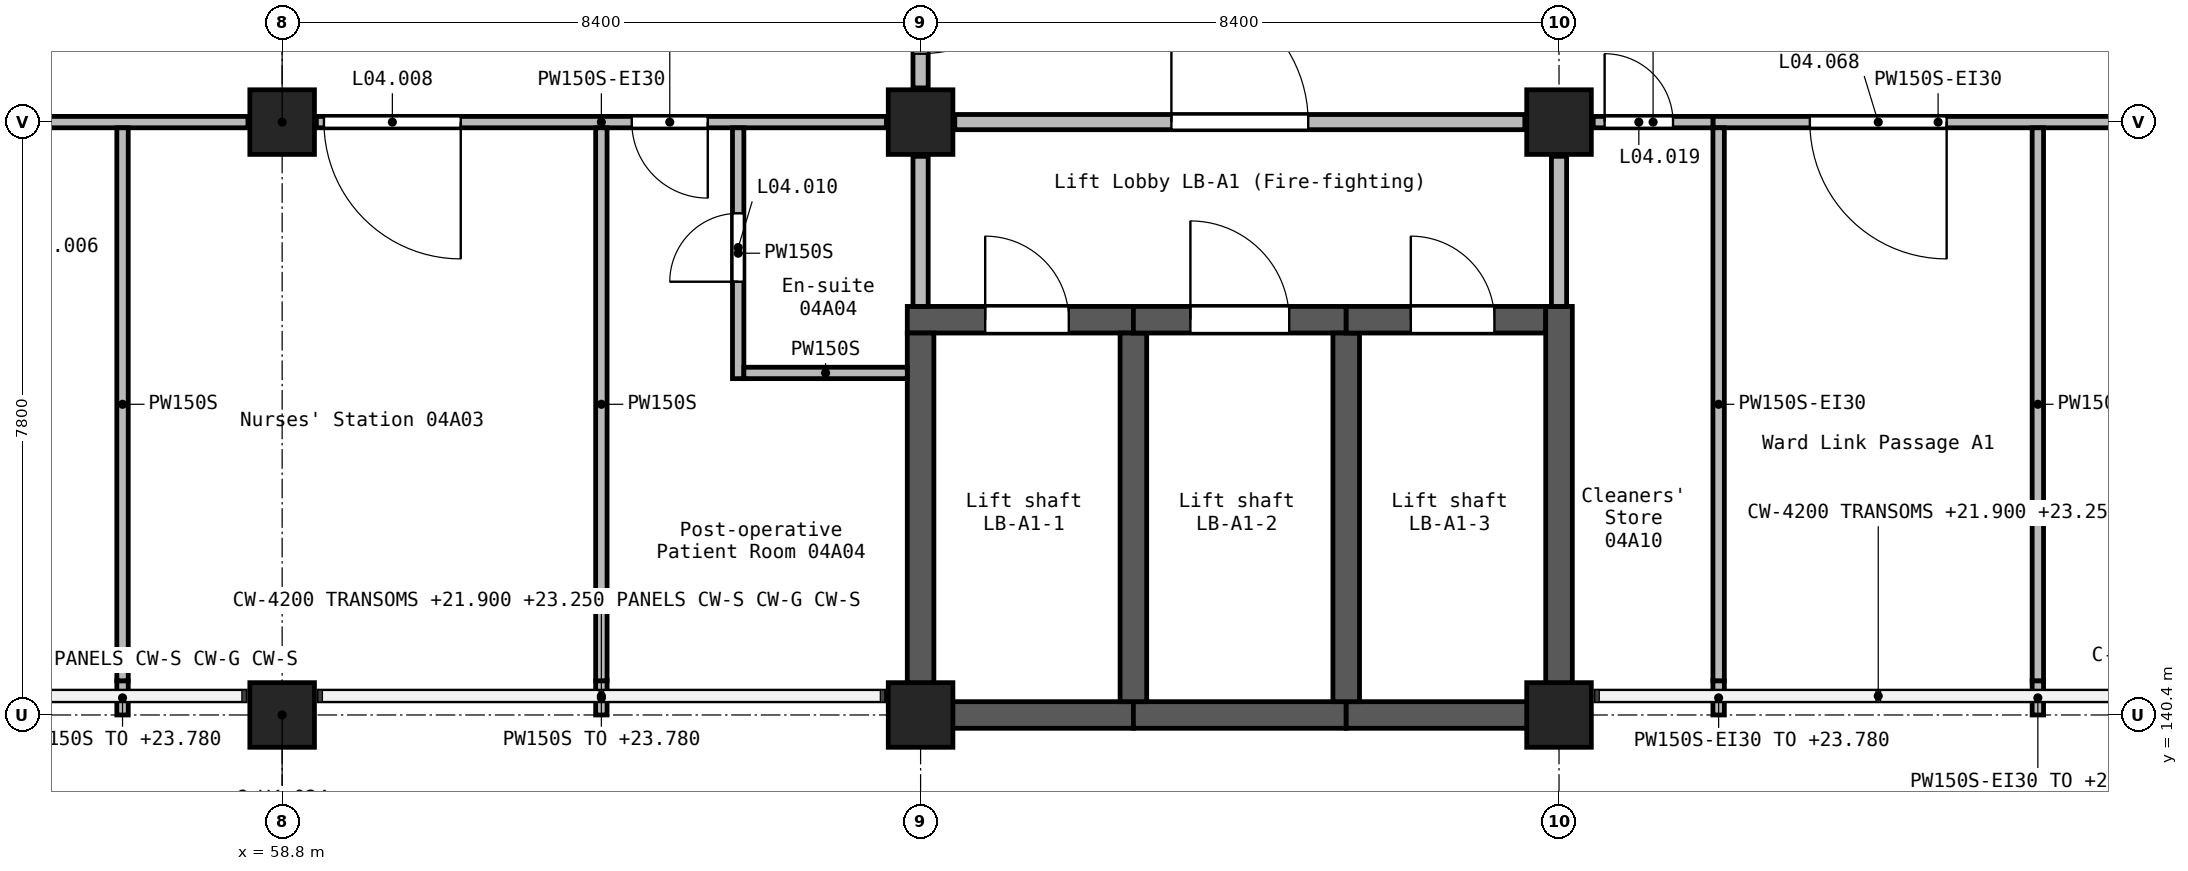
"""IFC4 building model, lengths in metres.
Left out: names, types, materials, properties, quantities, classifications, styles, units other than length and angle.
Written with IfcOpenShell. Run it as: python <this file> out.ifc"""

import sys

from ifc_helpers import new_model, si_unit, direction, frame, frame_2d, origin, origin_2d, place, context, subcontext, project, spatial, rectangle, extrude, element, fill, save


model = new_model("IFC4")
c1 = context("Model", 3, precision=1e-05, world=origin(), true_north=direction((0.0, 1.0)))
c2 = subcontext(c1, "Body", "Model", "MODEL_VIEW")
j1 = project(units=[si_unit("LENGTHUNIT", "METRE"), si_unit("PLANEANGLEUNIT", "RADIAN")], contexts=[c1])
p1 = place(None, origin())
s1 = spatial("IfcSite", under=j1, at=p1, CompositionType="ELEMENT")
p2 = place(p1, origin())
s2 = spatial("IfcBuilding", under=s1, at=p2, CompositionType="ELEMENT")
p3 = place(p2, frame((0.0, 0.0, 21.0)))
s3 = spatial("IfcBuildingStorey", under=s2, at=p3, CompositionType="ELEMENT", Elevation=21.0)
for number, where, z_axis, x_axis in (
    (1, (58.8, 140.4, 0.0), (0.0, 0.0, 1.0), (1.0, 0.0, 0.0)),
    (2, (58.8, 148.2, 0.0), (0.0, 0.0, 1.0), (1.0, 0.0, 0.0)),
    (3, (67.2, 140.4, 0.0), (0.0, 0.0, 1.0), (1.0, 0.0, 0.0)),
    (4, (67.2, 148.2, 0.0), (0.0, 0.0, 1.0), (1.0, 0.0, 0.0)),
    (5, (75.6, 140.4, 0.0), (0.0, 0.0, 1.0), (1.0, 0.0, 0.0)),
    (6, (75.6, 148.2, 0.0), (0.0, 0.0, 1.0), (1.0, 0.0, 0.0)),
):
    element("IfcColumn", number, at=place(p3, frame(where, z_axis=z_axis, x_axis=x_axis)), inside=s3, PredefinedType="COLUMN", context=c2, shape_type="SweptSolid", body=[
        extrude(rectangle(XDim=0.85, YDim=0.85, at=origin_2d()), origin(), (0.0, 0.0, 1.0), 3.9),
    ])
p4 = place(p3, frame((67.025, 145.6, 0.0), z_axis=(0.0, 0.0, 1.0), x_axis=(1.0, 0.0, 0.0)))
e7 = element("IfcWall", 7, at=p4, inside=s3, PredefinedType="SHEAR", context=c2, shape_type="SweptSolid", body=[
    extrude(rectangle(XDim=2.975, YDim=0.35, at=frame_2d((1.488, 0.0))), origin(), (0.0, 0.0, 1.0), 3.9),
])
p5 = place(p4, frame((1.025, 0.0, 0.0)))
e8 = element("IfcOpeningElement", 8, at=p5, cuts=e7, PredefinedType="OPENING", context=c2, shape_type="SweptSolid", body=[
    extrude(rectangle(XDim=1.1, YDim=2.1, at=frame_2d((0.55, 1.05))), frame((0.0, 0.185, 0.0), z_axis=(0.0, -1.0, 0.0), x_axis=(1.0, 0.0, 0.0)), (0.0, 0.0, 1.0), 0.37),
])
p6 = place(p3, frame((67.2, 140.225, 0.0), z_axis=(0.0, 0.0, 1.0), x_axis=(0.0, 1.0, 0.0)))
e9 = element("IfcWall", 9, at=p6, inside=s3, PredefinedType="SHEAR", context=c2, shape_type="SweptSolid", body=[
    extrude(rectangle(XDim=5.2, YDim=0.35, at=frame_2d((2.6, 0.0))), origin(), (0.0, 0.0, 1.0), 3.9),
])
p7 = place(p3, frame((67.375, 140.4, 0.0), z_axis=(0.0, 0.0, 1.0), x_axis=(1.0, 0.0, 0.0)))
e10 = element("IfcWall", 10, at=p7, inside=s3, PredefinedType="SHEAR", context=c2, shape_type="SweptSolid", body=[
    extrude(rectangle(XDim=2.625, YDim=0.35, at=frame_2d((1.312, 0.0))), origin(), (0.0, 0.0, 1.0), 3.9),
])
p8 = place(p3, frame((70.0, 140.4, 0.0), z_axis=(0.0, 0.0, 1.0), x_axis=(1.0, 0.0, 0.0)))
e11 = element("IfcWall", 11, at=p8, inside=s3, PredefinedType="SHEAR", context=c2, shape_type="SweptSolid", body=[
    extrude(rectangle(XDim=2.8, YDim=0.35, at=frame_2d((1.4, 0.0))), origin(), (0.0, 0.0, 1.0), 3.9),
])
p9 = place(p3, frame((70.0, 140.575, 0.0), z_axis=(0.0, 0.0, 1.0), x_axis=(0.0, 1.0, 0.0)))
e12 = element("IfcWall", 12, at=p9, inside=s3, PredefinedType="SHEAR", context=c2, shape_type="SweptSolid", body=[
    extrude(rectangle(XDim=4.85, YDim=0.35, at=frame_2d((2.425, 0.0))), origin(), (0.0, 0.0, 1.0), 3.9),
])
p10 = place(p3, frame((70.0, 145.6, 0.0), z_axis=(0.0, 0.0, 1.0), x_axis=(1.0, 0.0, 0.0)))
e13 = element("IfcWall", 13, at=p10, inside=s3, PredefinedType="SHEAR", context=c2, shape_type="SweptSolid", body=[
    extrude(rectangle(XDim=2.8, YDim=0.35, at=frame_2d((1.4, 0.0))), origin(), (0.0, 0.0, 1.0), 3.9),
])
p11 = place(p10, frame((0.75, 0.0, 0.0)))
e14 = element("IfcOpeningElement", 14, at=p11, cuts=e13, PredefinedType="OPENING", context=c2, shape_type="SweptSolid", body=[
    extrude(rectangle(XDim=1.3, YDim=2.1, at=frame_2d((0.65, 1.05))), frame((0.0, 0.185, 0.0), z_axis=(0.0, -1.0, 0.0), x_axis=(1.0, 0.0, 0.0)), (0.0, 0.0, 1.0), 0.37),
])
p12 = place(p3, frame((72.8, 140.4, 0.0), z_axis=(0.0, 0.0, 1.0), x_axis=(1.0, 0.0, 0.0)))
e15 = element("IfcWall", 15, at=p12, inside=s3, PredefinedType="SHEAR", context=c2, shape_type="SweptSolid", body=[
    extrude(rectangle(XDim=2.625, YDim=0.35, at=frame_2d((1.312, 0.0))), origin(), (0.0, 0.0, 1.0), 3.9),
])
p13 = place(p3, frame((72.8, 140.575, 0.0), z_axis=(0.0, 0.0, 1.0), x_axis=(0.0, 1.0, 0.0)))
e16 = element("IfcWall", 16, at=p13, inside=s3, PredefinedType="SHEAR", context=c2, shape_type="SweptSolid", body=[
    extrude(rectangle(XDim=4.85, YDim=0.35, at=frame_2d((2.425, 0.0))), origin(), (0.0, 0.0, 1.0), 3.9),
])
p14 = place(p3, frame((72.8, 145.6, 0.0), z_axis=(0.0, 0.0, 1.0), x_axis=(1.0, 0.0, 0.0)))
e17 = element("IfcWall", 17, at=p14, inside=s3, PredefinedType="SHEAR", context=c2, shape_type="SweptSolid", body=[
    extrude(rectangle(XDim=2.625, YDim=0.35, at=frame_2d((1.312, 0.0))), origin(), (0.0, 0.0, 1.0), 3.9),
])
p15 = place(p14, frame((0.85, 0.0, 0.0)))
e18 = element("IfcOpeningElement", 18, at=p15, cuts=e17, PredefinedType="OPENING", context=c2, shape_type="SweptSolid", body=[
    extrude(rectangle(XDim=1.1, YDim=2.1, at=frame_2d((0.55, 1.05))), frame((0.0, 0.185, 0.0), z_axis=(0.0, -1.0, 0.0), x_axis=(1.0, 0.0, 0.0)), (0.0, 0.0, 1.0), 0.37),
])
p16 = place(p3, frame((75.6, 140.225, 0.0), z_axis=(0.0, 0.0, 1.0), x_axis=(0.0, 1.0, 0.0)))
e19 = element("IfcWall", 19, at=p16, inside=s3, PredefinedType="SHEAR", context=c2, shape_type="SweptSolid", body=[
    extrude(rectangle(XDim=5.55, YDim=0.35, at=frame_2d((2.775, 0.0))), origin(), (0.0, 0.0, 1.0), 3.9),
])
p17 = place(p3, frame((67.2, 151.35, 0.0), z_axis=(0.0, 0.0, 1.0), x_axis=(0.0, -1.0, 0.0)))
e20 = element("IfcWall", 20, at=p17, inside=s3, PredefinedType="SOLIDWALL", context=c2, shape_type="SweptSolid", body=[
    extrude(rectangle(XDim=2.7, YDim=0.2, at=frame_2d((1.35, 0.0))), origin(), (0.0, 0.0, 1.0), 3.6),
])
p18 = place(p17, frame((0.45, 0.0, 0.0)))
e21 = element("IfcOpeningElement", 21, at=p18, cuts=e20, PredefinedType="OPENING", context=c2, shape_type="SweptSolid", body=[
    extrude(rectangle(XDim=1.8, YDim=2.1, at=frame_2d((0.9, 1.05))), frame((0.0, 0.11, 0.0), z_axis=(0.0, -1.0, 0.0), x_axis=(1.0, 0.0, 0.0)), (0.0, 0.0, 1.0), 0.22),
])
p19 = place(p3, frame((67.2, 147.75, 0.0), z_axis=(0.0, 0.0, 1.0), x_axis=(0.0, -1.0, 0.0)))
e22 = element("IfcWall", 22, at=p19, inside=s3, PredefinedType="SOLIDWALL", context=c2, shape_type="SweptSolid", body=[
    extrude(rectangle(XDim=1.975, YDim=0.2, at=frame_2d((0.988, 0.0))), origin(), (0.0, 0.0, 1.0), 3.6),
])
p20 = place(p3, frame((67.65, 148.2, 0.0), z_axis=(0.0, 0.0, 1.0), x_axis=(1.0, 0.0, 0.0)))
e23 = element("IfcWall", 23, at=p20, inside=s3, PredefinedType="SOLIDWALL", context=c2, shape_type="SweptSolid", body=[
    extrude(rectangle(XDim=7.5, YDim=0.2, at=frame_2d((3.75, 0.0))), origin(), (0.0, 0.0, 1.0), 3.6),
])
p21 = place(p20, frame((2.85, 0.0, 0.0)))
e24 = element("IfcOpeningElement", 24, at=p21, cuts=e23, PredefinedType="OPENING", context=c2, shape_type="SweptSolid", body=[
    extrude(rectangle(XDim=1.8, YDim=2.1, at=frame_2d((0.9, 1.05))), frame((0.0, 0.11, 0.0), z_axis=(0.0, -1.0, 0.0), x_axis=(1.0, 0.0, 0.0)), (0.0, 0.0, 1.0), 0.22),
])
p22 = place(p3, frame((75.6, 145.775, 0.0), z_axis=(0.0, 0.0, 1.0), x_axis=(0.0, 1.0, 0.0)))
e25 = element("IfcWall", 25, at=p22, inside=s3, PredefinedType="SOLIDWALL", context=c2, shape_type="SweptSolid", body=[
    extrude(rectangle(XDim=1.975, YDim=0.2, at=frame_2d((0.988, 0.0))), origin(), (0.0, 0.0, 1.0), 3.6),
])
p23 = place(p3, frame((66.75, 148.2, 0.0), z_axis=(0.0, 0.0, 1.0), x_axis=(-1.0, 0.0, 0.0)))
e26 = element("IfcWall", 26, at=p23, inside=s3, PredefinedType="PARTITIONING", context=c2, shape_type="SweptSolid", body=[
    extrude(rectangle(XDim=7.5, YDim=0.15, at=frame_2d((3.75, 0.0))), origin(), (0.0, 0.0, 1.0), 3.6),
])
p24 = place(p23, frame((5.6, 0.0, 0.0)))
e27 = element("IfcOpeningElement", 27, at=p24, cuts=e26, PredefinedType="OPENING", context=c2, shape_type="SweptSolid", body=[
    extrude(rectangle(XDim=1.8, YDim=2.1, at=frame_2d((0.9, 1.05))), frame((0.0, 0.085, 0.0), z_axis=(0.0, -1.0, 0.0), x_axis=(1.0, 0.0, 0.0)), (0.0, 0.0, 1.0), 0.17),
])
p25 = place(p23, frame((2.35, 0.0, 0.0)))
e28 = element("IfcOpeningElement", 28, at=p25, cuts=e26, PredefinedType="OPENING", context=c2, shape_type="SweptSolid", body=[
    extrude(rectangle(XDim=1.0, YDim=2.1, at=frame_2d((0.5, 1.05))), frame((0.0, 0.085, 0.0), z_axis=(0.0, -1.0, 0.0), x_axis=(1.0, 0.0, 0.0)), (0.0, 0.0, 1.0), 0.17),
])
p26 = place(p3, frame((58.35, 148.2, 0.0), z_axis=(0.0, 0.0, 1.0), x_axis=(-1.0, 0.0, 0.0)))
e29 = element("IfcWall", 29, at=p26, inside=s3, PredefinedType="PARTITIONING", context=c2, shape_type="SweptSolid", body=[
    extrude(rectangle(XDim=7.5, YDim=0.15, at=frame_2d((3.75, 0.0))), origin(), (0.0, 0.0, 1.0), 3.6),
])
p27 = place(p26, frame((2.95, 0.0, 0.0)))
e30 = element("IfcOpeningElement", 30, at=p27, cuts=e29, PredefinedType="OPENING", context=c2, shape_type="SweptSolid", body=[
    extrude(rectangle(XDim=1.0, YDim=2.1, at=frame_2d((0.5, 1.05))), frame((0.0, 0.085, 0.0), z_axis=(0.0, -1.0, 0.0), x_axis=(1.0, 0.0, 0.0)), (0.0, 0.0, 1.0), 0.17),
])
p28 = place(p3, frame((83.55, 148.2, 0.0), z_axis=(0.0, 0.0, 1.0), x_axis=(-1.0, 0.0, 0.0)))
e31 = element("IfcWall", 31, at=p28, inside=s3, PredefinedType="PARTITIONING", context=c2, shape_type="SweptSolid", body=[
    extrude(rectangle(XDim=5.925, YDim=0.15, at=frame_2d((2.962, 0.0))), origin(), (0.0, 0.0, 1.0), 3.6),
])
p29 = place(p28, frame((2.85, 0.0, 0.0)))
e32 = element("IfcOpeningElement", 32, at=p29, cuts=e31, PredefinedType="OPENING", context=c2, shape_type="SweptSolid", body=[
    extrude(rectangle(XDim=1.8, YDim=2.1, at=frame_2d((0.9, 1.05))), frame((0.0, 0.085, 0.0), z_axis=(0.0, -1.0, 0.0), x_axis=(1.0, 0.0, 0.0)), (0.0, 0.0, 1.0), 0.17),
])
p30 = place(p3, frame((77.7, 140.4, 0.0), z_axis=(0.0, 0.0, 1.0), x_axis=(0.0, 1.0, 0.0)))
e33 = element("IfcWall", 33, at=p30, inside=s3, PredefinedType="PARTITIONING", context=c2, shape_type="SweptSolid", body=[
    extrude(rectangle(XDim=0.45, YDim=0.15, at=frame_2d((0.225, 0.0))), origin(), (0.0, 0.0, 1.0), 2.78),
])
p31 = place(p3, frame((77.7, 140.85, 0.0), z_axis=(0.0, 0.0, 1.0), x_axis=(0.0, 1.0, 0.0)))
e34 = element("IfcWall", 34, at=p31, inside=s3, PredefinedType="PARTITIONING", context=c2, shape_type="SweptSolid", body=[
    extrude(rectangle(XDim=7.275, YDim=0.15, at=frame_2d((3.637, 0.0))), origin(), (0.0, 0.0, 1.0), 3.6),
])
p32 = place(p3, frame((81.9, 140.4, 0.0), z_axis=(0.0, 0.0, 1.0), x_axis=(0.0, 1.0, 0.0)))
e35 = element("IfcWall", 35, at=p32, inside=s3, PredefinedType="PARTITIONING", context=c2, shape_type="SweptSolid", body=[
    extrude(rectangle(XDim=0.45, YDim=0.15, at=frame_2d((0.225, 0.0))), origin(), (0.0, 0.0, 1.0), 2.78),
])
p33 = place(p3, frame((81.9, 140.85, 0.0), z_axis=(0.0, 0.0, 1.0), x_axis=(0.0, 1.0, 0.0)))
e36 = element("IfcWall", 36, at=p33, inside=s3, PredefinedType="PARTITIONING", context=c2, shape_type="SweptSolid", body=[
    extrude(rectangle(XDim=7.275, YDim=0.15, at=frame_2d((3.637, 0.0))), origin(), (0.0, 0.0, 1.0), 3.6),
])
p34 = place(p3, frame((76.05, 148.2, 0.0), z_axis=(0.0, 0.0, 1.0), x_axis=(1.0, 0.0, 0.0)))
e37 = element("IfcWall", 37, at=p34, inside=s3, PredefinedType="PARTITIONING", context=c2, shape_type="SweptSolid", body=[
    extrude(rectangle(XDim=1.575, YDim=0.15, at=frame_2d((0.788, 0.0))), origin(), (0.0, 0.0, 1.0), 3.6),
])
p35 = place(p34, frame((0.15, 0.0, 0.0)))
e38 = element("IfcOpeningElement", 38, at=p35, cuts=e37, PredefinedType="OPENING", context=c2, shape_type="SweptSolid", body=[
    extrude(rectangle(XDim=0.9, YDim=2.1, at=frame_2d((0.45, 1.05))), frame((0.0, 0.085, 0.0), z_axis=(0.0, -1.0, 0.0), x_axis=(1.0, 0.0, 0.0)), (0.0, 0.0, 1.0), 0.17),
])
p36 = place(p3, frame((56.7, 140.4, 0.0), z_axis=(0.0, 0.0, 1.0), x_axis=(0.0, 1.0, 0.0)))
e39 = element("IfcWall", 39, at=p36, inside=s3, PredefinedType="PARTITIONING", context=c2, shape_type="SweptSolid", body=[
    extrude(rectangle(XDim=0.45, YDim=0.15, at=frame_2d((0.225, 0.0))), origin(), (0.0, 0.0, 1.0), 2.78),
])
p37 = place(p3, frame((56.7, 140.85, 0.0), z_axis=(0.0, 0.0, 1.0), x_axis=(0.0, 1.0, 0.0)))
e40 = element("IfcWall", 40, at=p37, inside=s3, PredefinedType="PARTITIONING", context=c2, shape_type="SweptSolid", body=[
    extrude(rectangle(XDim=7.275, YDim=0.15, at=frame_2d((3.637, 0.0))), origin(), (0.0, 0.0, 1.0), 3.6),
])
p38 = place(p3, frame((63.0, 140.4, 0.0), z_axis=(0.0, 0.0, 1.0), x_axis=(0.0, 1.0, 0.0)))
e41 = element("IfcWall", 41, at=p38, inside=s3, PredefinedType="PARTITIONING", context=c2, shape_type="SweptSolid", body=[
    extrude(rectangle(XDim=0.45, YDim=0.15, at=frame_2d((0.225, 0.0))), origin(), (0.0, 0.0, 1.0), 2.78),
])
p39 = place(p3, frame((63.0, 140.85, 0.0), z_axis=(0.0, 0.0, 1.0), x_axis=(0.0, 1.0, 0.0)))
e42 = element("IfcWall", 42, at=p39, inside=s3, PredefinedType="PARTITIONING", context=c2, shape_type="SweptSolid", body=[
    extrude(rectangle(XDim=7.275, YDim=0.15, at=frame_2d((3.637, 0.0))), origin(), (0.0, 0.0, 1.0), 3.6),
])
p40 = place(p3, frame((64.8, 144.825, 0.0), z_axis=(0.0, 0.0, 1.0), x_axis=(0.0, 1.0, 0.0)))
e43 = element("IfcWall", 43, at=p40, inside=s3, PredefinedType="PARTITIONING", context=c2, shape_type="SweptSolid", body=[
    extrude(rectangle(XDim=3.3, YDim=0.15, at=frame_2d((1.65, 0.0))), origin(), (0.0, 0.0, 1.0), 3.6),
])
p41 = place(p40, frame((1.275, 0.0, 0.0)))
e44 = element("IfcOpeningElement", 44, at=p41, cuts=e43, PredefinedType="OPENING", context=c2, shape_type="SweptSolid", body=[
    extrude(rectangle(XDim=0.9, YDim=2.1, at=frame_2d((0.45, 1.05))), frame((0.0, 0.085, 0.0), z_axis=(0.0, -1.0, 0.0), x_axis=(1.0, 0.0, 0.0)), (0.0, 0.0, 1.0), 0.17),
])
p42 = place(p3, frame((64.875, 144.9, 0.0), z_axis=(0.0, 0.0, 1.0), x_axis=(1.0, 0.0, 0.0)))
e45 = element("IfcWall", 45, at=p42, inside=s3, PredefinedType="PARTITIONING", context=c2, shape_type="SweptSolid", body=[
    extrude(rectangle(XDim=2.15, YDim=0.15, at=frame_2d((1.075, 0.0))), origin(), (0.0, 0.0, 1.0), 3.6),
])
p43 = place(p18, origin())
e46 = element("IfcDoor", 46, at=p43, inside=s3, OperationType="DOUBLE_DOOR_SINGLE_SWING", PredefinedType="DOOR", context=c2, shape_type="SweptSolid", body=[
    extrude(rectangle(XDim=1.8, YDim=2.1, at=frame_2d((0.9, 1.05))), frame((0.0, 0.025, 0.0), z_axis=(0.0, -1.0, 0.0), x_axis=(1.0, 0.0, 0.0)), (0.0, 0.0, 1.0), 0.05),
])
fill(e21, e46)
p44 = place(p24, origin())
e47 = element("IfcDoor", 47, at=p44, inside=s3, OperationType="DOUBLE_DOOR_SINGLE_SWING", PredefinedType="DOOR", context=c2, shape_type="SweptSolid", body=[
    extrude(rectangle(XDim=1.8, YDim=2.1, at=frame_2d((0.9, 1.05))), frame((0.0, 0.025, 0.0), z_axis=(0.0, -1.0, 0.0), x_axis=(1.0, 0.0, 0.0)), (0.0, 0.0, 1.0), 0.05),
])
fill(e27, e47)
p45 = place(p25, origin())
e48 = element("IfcDoor", 48, at=p45, inside=s3, OperationType="SINGLE_SWING_LEFT", PredefinedType="DOOR", context=c2, shape_type="SweptSolid", body=[
    extrude(rectangle(XDim=1.0, YDim=2.1, at=frame_2d((0.5, 1.05))), frame((0.0, 0.025, 0.0), z_axis=(0.0, -1.0, 0.0), x_axis=(1.0, 0.0, 0.0)), (0.0, 0.0, 1.0), 0.05),
])
fill(e28, e48)
p46 = place(p41, frame((0.9, 0.0, 0.0), z_axis=(0.0, 0.0, 1.0), x_axis=(-1.0, 0.0, 0.0)))
e49 = element("IfcDoor", 49, at=p46, inside=s3, OperationType="SINGLE_SWING_LEFT", PredefinedType="DOOR", context=c2, shape_type="SweptSolid", body=[
    extrude(rectangle(XDim=0.9, YDim=2.1, at=frame_2d((0.45, 1.05))), frame((0.0, 0.025, 0.0), z_axis=(0.0, -1.0, 0.0), x_axis=(1.0, 0.0, 0.0)), (0.0, 0.0, 1.0), 0.05),
])
fill(e44, e49)
p47 = place(p35, frame((0.9, 0.0, 0.0), z_axis=(0.0, 0.0, 1.0), x_axis=(-1.0, 0.0, 0.0)))
e50 = element("IfcDoor", 50, at=p47, inside=s3, OperationType="SINGLE_SWING_RIGHT", PredefinedType="DOOR", context=c2, shape_type="SweptSolid", body=[
    extrude(rectangle(XDim=0.9, YDim=2.1, at=frame_2d((0.45, 1.05))), frame((0.0, 0.025, 0.0), z_axis=(0.0, -1.0, 0.0), x_axis=(1.0, 0.0, 0.0)), (0.0, 0.0, 1.0), 0.05),
])
fill(e38, e50)
p48 = place(p29, origin())
e51 = element("IfcDoor", 51, at=p48, inside=s3, OperationType="DOUBLE_DOOR_SINGLE_SWING", PredefinedType="DOOR", context=c2, shape_type="SweptSolid", body=[
    extrude(rectangle(XDim=1.8, YDim=2.1, at=frame_2d((0.9, 1.05))), frame((0.0, 0.025, 0.0), z_axis=(0.0, -1.0, 0.0), x_axis=(1.0, 0.0, 0.0)), (0.0, 0.0, 1.0), 0.05),
])
fill(e32, e51)
p49 = place(p21, frame((1.8, 0.0, 0.0), z_axis=(0.0, 0.0, 1.0), x_axis=(-1.0, 0.0, 0.0)))
e52 = element("IfcDoor", 52, at=p49, inside=s3, OperationType="DOUBLE_DOOR_SINGLE_SWING", PredefinedType="DOOR", context=c2, shape_type="SweptSolid", body=[
    extrude(rectangle(XDim=1.8, YDim=2.1, at=frame_2d((0.9, 1.05))), frame((0.0, 0.025, 0.0), z_axis=(0.0, -1.0, 0.0), x_axis=(1.0, 0.0, 0.0)), (0.0, 0.0, 1.0), 0.05),
])
fill(e24, e52)
p50 = place(p5, origin())
e53 = element("IfcDoor", 53, at=p50, inside=s3, OperationType="DOUBLE_DOOR_SLIDING", PredefinedType="DOOR", context=c2, shape_type="SweptSolid", body=[
    extrude(rectangle(XDim=1.1, YDim=2.1, at=frame_2d((0.55, 1.05))), frame((0.0, 0.025, 0.0), z_axis=(0.0, -1.0, 0.0), x_axis=(1.0, 0.0, 0.0)), (0.0, 0.0, 1.0), 0.05),
])
fill(e8, e53)
p51 = place(p11, origin())
e54 = element("IfcDoor", 54, at=p51, inside=s3, OperationType="DOUBLE_DOOR_SLIDING", PredefinedType="DOOR", context=c2, shape_type="SweptSolid", body=[
    extrude(rectangle(XDim=1.3, YDim=2.1, at=frame_2d((0.65, 1.05))), frame((0.0, 0.025, 0.0), z_axis=(0.0, -1.0, 0.0), x_axis=(1.0, 0.0, 0.0)), (0.0, 0.0, 1.0), 0.05),
])
fill(e14, e54)
p52 = place(p15, origin())
e55 = element("IfcDoor", 55, at=p52, inside=s3, OperationType="DOUBLE_DOOR_SLIDING", PredefinedType="DOOR", context=c2, shape_type="SweptSolid", body=[
    extrude(rectangle(XDim=1.1, YDim=2.1, at=frame_2d((0.55, 1.05))), frame((0.0, 0.025, 0.0), z_axis=(0.0, -1.0, 0.0), x_axis=(1.0, 0.0, 0.0)), (0.0, 0.0, 1.0), 0.05),
])
fill(e18, e55)
save(model, sys.argv[1])
